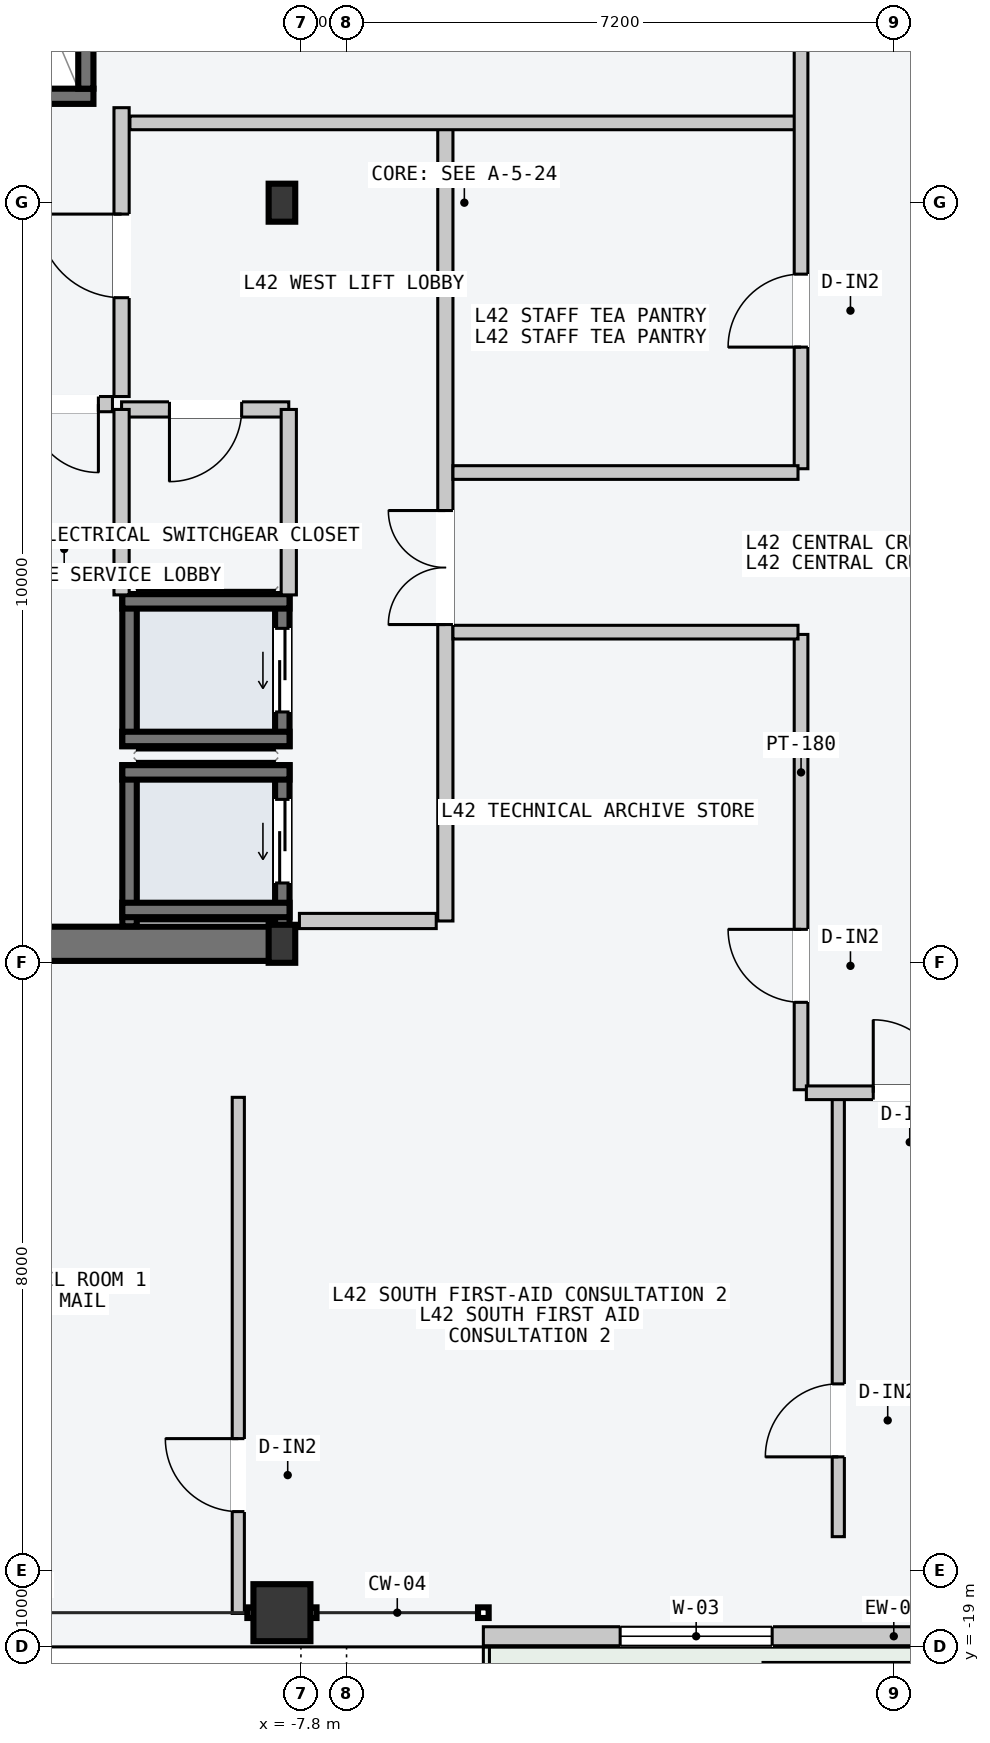
"""IFC4 building model, lengths in metres.
Left out: names, types, materials, properties, quantities, classifications, styles, units other than length and angle.
Written with IfcOpenShell. Run it as: python <this file> out.ifc"""

import sys

from ifc_helpers import new_model, si_unit, direction, frame, frame_2d, origin, origin_2d, place, context, subcontext, project, spatial, rectangle, hollow_rectangle, i_section, extrude, element, fill, save


model = new_model("IFC4")
c1 = context("Model", 3, precision=1e-05, world=origin(), true_north=direction((0.0, 1.0)))
c2 = subcontext(c1, "Body", "Model", "MODEL_VIEW")
j1 = project(units=[si_unit("LENGTHUNIT", "METRE"), si_unit("PLANEANGLEUNIT", "RADIAN")], contexts=[c1])
p1 = place(None, origin())
s1 = spatial("IfcSite", under=j1, at=p1, CompositionType="ELEMENT")
p2 = place(p1, origin())
s2 = spatial("IfcBuilding", under=s1, at=p2, CompositionType="ELEMENT")
p3 = place(p2, frame((0.0, 0.0, 162.3)))
s3 = spatial("IfcBuildingStorey", under=s2, at=p3, CompositionType="ELEMENT", Elevation=162.3)
p4 = place(p3, frame((-14.53, -9.75, -0.2), z_axis=(0.0, 0.0, 1.0), x_axis=(1.0, 0.0, 0.0)))
e1 = element("IfcWall", 1, at=p4, inside=s3, PredefinedType="SHEAR", context=c2, shape_type="SweptSolid", body=[
    extrude(rectangle(XDim=6.46, YDim=0.45, at=frame_2d((3.23, 0.0))), origin(), (0.0, 0.0, 1.0), 3.6),
])
p5 = place(p3, frame((-14.25, 1.4, -0.2), z_axis=(0.0, 0.0, 1.0), x_axis=(1.0, 0.0, 0.0)))
e2 = element("IfcWall", 2, at=p5, inside=s3, PredefinedType="SOLIDWALL", context=c2, shape_type="SweptSolid", body=[
    extrude(rectangle(XDim=3.72, YDim=0.2, at=frame_2d((1.86, 0.0))), origin(), (0.0, 0.0, 1.0), 3.6),
])
p6 = place(p5, frame((1.5, 0.0, 0.2)))
e3 = element("IfcOpeningElement", 3, at=p6, cuts=e2, PredefinedType="OPENING", context=c2, shape_type="SweptSolid", body=[
    extrude(rectangle(XDim=1.12, YDim=2.18, at=frame_2d((0.56, 1.09))), frame((0.0, 0.11, 0.0), z_axis=(0.0, -1.0, 0.0), x_axis=(1.0, 0.0, 0.0)), (0.0, 0.0, 1.0), 0.22),
])
p7 = place(p3, frame((-10.63, 1.5, -0.2), z_axis=(0.0, 0.0, 1.0), x_axis=(0.0, 1.0, 0.0)))
e4 = element("IfcWall", 4, at=p7, inside=s3, PredefinedType="SOLIDWALL", context=c2, shape_type="SweptSolid", body=[
    extrude(rectangle(XDim=7.8, YDim=0.2, at=frame_2d((3.9, 0.0))), origin(), (0.0, 0.0, 1.0), 3.6),
])
for number, where, z_axis, x_axis in (
    (5, (-8.05, -9.75, 0.0), (0.0, 0.0, 1.0), (1.0, 0.0, 0.0)),
    (6, (-8.05, 0.0, 0.0), (0.0, 0.0, 1.0), (1.0, 0.0, 0.0)),
):
    element("IfcColumn", number, at=place(p3, frame(where, z_axis=z_axis, x_axis=x_axis)), inside=s3, PredefinedType="COLUMN", context=c2, shape_type="SweptSolid", body=[
        extrude(i_section(OverallWidth=0.35, OverallDepth=0.5, WebThickness=0.02, FlangeThickness=0.032, at=origin_2d()), origin(), (0.0, 0.0, 1.0), 3.6),
    ])
p8 = place(p3, frame((-8.05, -18.55, 0.0), z_axis=(0.0, 0.0, 1.0), x_axis=(1.0, 0.0, 0.0)))
e7 = element("IfcColumn", 7, at=p8, inside=s3, PredefinedType="COLUMN", context=c2, shape_type="SweptSolid", body=[
    extrude(hollow_rectangle(XDim=0.75, YDim=0.75, WallThickness=0.032, at=origin_2d()), origin(), (0.0, 0.0, 1.0), 3.6),
])
p9 = place(p3, frame((-5.4, -18.86, 0.0), z_axis=(0.0, 0.0, 1.0), x_axis=(1.0, 0.0, 0.0)))
e8 = element("IfcWall", 8, at=p9, inside=s3, PredefinedType="STANDARD", context=c2, shape_type="SweptSolid", body=[
    extrude(rectangle(XDim=10.8, YDim=0.25, at=frame_2d((5.4, 0.0))), origin(), (0.0, 0.0, 1.0), 3.4),
])
p10 = place(p9, frame((7.0, 0.0, 0.0)))
e9 = element("IfcOpeningElement", 9, at=p10, cuts=e8, PredefinedType="OPENING", context=c2, shape_type="SweptSolid", body=[
    extrude(rectangle(XDim=1.6, YDim=2.2, at=frame_2d((0.8, 1.1))), frame((0.0, 0.135, 0.0), z_axis=(0.0, -1.0, 0.0), x_axis=(1.0, 0.0, 0.0)), (0.0, 0.0, 1.0), 0.27),
])
p11 = place(p9, frame((1.8, 0.0, 0.85)))
e10 = element("IfcOpeningElement", 10, at=p11, cuts=e8, PredefinedType="OPENING", context=c2, shape_type="SweptSolid", body=[
    extrude(rectangle(XDim=2.0, YDim=2.1, at=frame_2d((1.0, 1.05))), frame((0.0, 0.135, 0.0), z_axis=(0.0, -1.0, 0.0), x_axis=(1.0, 0.0, 0.0)), (0.0, 0.0, 1.0), 0.27),
])
p12 = place(p3, frame((-8.045, -9.52, -0.2), z_axis=(0.0, 0.0, 1.0), x_axis=(0.0, 1.0, 0.0)))
e11 = element("IfcWall", 11, at=p12, inside=s3, PredefinedType="SOLIDWALL", context=c2, shape_type="SweptSolid", body=[
    extrude(rectangle(XDim=2.12, YDim=0.19, at=frame_2d((1.06, 0.0))), origin(), (0.0, 0.0, 1.0), 3.6),
])
p13 = place(p12, frame((0.57, 0.0, 0.2)))
e12 = element("IfcOpeningElement", 12, at=p13, cuts=e11, PredefinedType="OPENING", context=c2, shape_type="SweptSolid", body=[
    extrude(rectangle(XDim=1.1, YDim=2.2, at=frame_2d((0.55, 1.1))), frame((0.0, 0.105, 0.0), z_axis=(0.0, -1.0, 0.0), x_axis=(1.0, 0.0, 0.0)), (0.0, 0.0, 1.0), 0.21),
])
p14 = place(p3, frame((-10.055, -9.52, -0.2), z_axis=(0.0, 0.0, 1.0), x_axis=(0.0, 1.0, 0.0)))
e13 = element("IfcWall", 13, at=p14, inside=s3, PredefinedType="SOLIDWALL", context=c2, shape_type="SweptSolid", body=[
    extrude(rectangle(XDim=2.12, YDim=0.19, at=frame_2d((1.06, 0.0))), origin(), (0.0, 0.0, 1.0), 3.6),
])
for number, where, z_axis, x_axis in (
    (14, (-10.15, -7.495, -0.2), (0.0, 0.0, 1.0), (1.0, 0.0, 0.0)),
    (15, (-10.15, -9.305, -0.2), (0.0, 0.0, 1.0), (1.0, 0.0, 0.0)),
):
    element("IfcWall", number, at=place(p3, frame(where, z_axis=z_axis, x_axis=x_axis)), inside=s3, PredefinedType="SOLIDWALL", context=c2, shape_type="SweptSolid", body=[
        extrude(rectangle(XDim=2.2, YDim=0.19, at=frame_2d((1.1, 0.0))), origin(), (0.0, 0.0, 1.0), 3.6),
    ])
p15 = place(p3, frame((-8.045, -7.15, -0.2), z_axis=(0.0, 0.0, 1.0), x_axis=(0.0, 1.0, 0.0)))
e16 = element("IfcWall", 16, at=p15, inside=s3, PredefinedType="SOLIDWALL", context=c2, shape_type="SweptSolid", body=[
    extrude(rectangle(XDim=2.0, YDim=0.19, at=frame_2d((1.0, 0.0))), origin(), (0.0, 0.0, 1.0), 3.6),
])
p16 = place(p15, frame((0.45, 0.0, 0.2)))
e17 = element("IfcOpeningElement", 17, at=p16, cuts=e16, PredefinedType="OPENING", context=c2, shape_type="SweptSolid", body=[
    extrude(rectangle(XDim=1.1, YDim=2.2, at=frame_2d((0.55, 1.1))), frame((0.0, 0.105, 0.0), z_axis=(0.0, -1.0, 0.0), x_axis=(1.0, 0.0, 0.0)), (0.0, 0.0, 1.0), 0.21),
])
p17 = place(p3, frame((-10.055, -7.15, -0.2), z_axis=(0.0, 0.0, 1.0), x_axis=(0.0, 1.0, 0.0)))
e18 = element("IfcWall", 18, at=p17, inside=s3, PredefinedType="SOLIDWALL", context=c2, shape_type="SweptSolid", body=[
    extrude(rectangle(XDim=2.0, YDim=0.19, at=frame_2d((1.0, 0.0))), origin(), (0.0, 0.0, 1.0), 3.6),
])
for number, where, z_axis, x_axis in (
    (19, (-10.15, -5.245, -0.2), (0.0, 0.0, 1.0), (1.0, 0.0, 0.0)),
    (20, (-10.15, -7.055, -0.2), (0.0, 0.0, 1.0), (1.0, 0.0, 0.0)),
):
    element("IfcWall", number, at=place(p3, frame(where, z_axis=z_axis, x_axis=x_axis)), inside=s3, PredefinedType="SOLIDWALL", context=c2, shape_type="SweptSolid", body=[
        extrude(rectangle(XDim=2.2, YDim=0.19, at=frame_2d((1.1, 0.0))), origin(), (0.0, 0.0, 1.0), 3.6),
    ])
p18 = place(p3, frame((-5.9, -9.45, 0.0), z_axis=(0.0, 0.0, 1.0), x_axis=(0.0, 1.0, 0.0)))
e21 = element("IfcWall", 21, at=p18, inside=s3, PredefinedType="PARTITIONING", context=c2, shape_type="SweptSolid", body=[
    extrude(rectangle(XDim=10.5, YDim=0.2, at=frame_2d((5.25, 0.0))), origin(), (0.0, 0.0, 1.0), 3.4),
])
p19 = place(p18, frame((3.9, 0.0, 0.0)))
e22 = element("IfcOpeningElement", 22, at=p19, cuts=e21, PredefinedType="OPENING", context=c2, shape_type="SweptSolid", body=[
    extrude(rectangle(XDim=1.5, YDim=2.2, at=frame_2d((0.75, 1.1))), frame((0.0, 0.11, 0.0), z_axis=(0.0, -1.0, 0.0), x_axis=(1.0, 0.0, 0.0)), (0.0, 0.0, 1.0), 0.22),
])
p20 = place(p3, frame((-6.02, -9.45, 0.0), z_axis=(0.0, 0.0, 1.0), x_axis=(-1.0, 0.0, 0.0)))
e23 = element("IfcWall", 23, at=p20, inside=s3, PredefinedType="PARTITIONING", context=c2, shape_type="SweptSolid", body=[
    extrude(rectangle(XDim=1.8, YDim=0.2, at=frame_2d((0.9, 0.0))), origin(), (0.0, 0.0, 1.0), 3.4),
])
p21 = place(p3, frame((-10.16, -2.55, 0.0), z_axis=(0.0, 0.0, 1.0), x_axis=(0.0, 1.0, 0.0)))
e24 = element("IfcWall", 24, at=p21, inside=s3, PredefinedType="PARTITIONING", context=c2, shape_type="SweptSolid", body=[
    extrude(rectangle(XDim=3.8, YDim=0.2, at=frame_2d((1.9, 0.0))), origin(), (0.0, 0.0, 1.0), 3.4),
])
p22 = place(p21, frame((1.3, 0.0, 0.0)))
e25 = element("IfcOpeningElement", 25, at=p22, cuts=e24, PredefinedType="OPENING", context=c2, shape_type="SweptSolid", body=[
    extrude(rectangle(XDim=1.1, YDim=2.15, at=frame_2d((0.55, 1.075))), frame((0.0, 0.11, 0.0), z_axis=(0.0, -1.0, 0.0), x_axis=(1.0, 0.0, 0.0)), (0.0, 0.0, 1.0), 0.22),
])
p23 = place(p3, frame((-10.28, -2.65, 0.0), z_axis=(0.0, 0.0, 1.0), x_axis=(-1.0, 0.0, 0.0)))
e26 = element("IfcWall", 26, at=p23, inside=s3, PredefinedType="PARTITIONING", context=c2, shape_type="SweptSolid", body=[
    extrude(rectangle(XDim=1.27, YDim=0.2, at=frame_2d((0.635, 0.0))), origin(), (0.0, 0.0, 1.0), 3.4),
])
p24 = place(p23, frame((0.185, 0.0, 0.0)))
e27 = element("IfcOpeningElement", 27, at=p24, cuts=e26, PredefinedType="OPENING", context=c2, shape_type="SweptSolid", body=[
    extrude(rectangle(XDim=0.9, YDim=2.15, at=frame_2d((0.45, 1.075))), frame((0.0, 0.11, 0.0), z_axis=(0.0, -1.0, 0.0), x_axis=(1.0, 0.0, 0.0)), (0.0, 0.0, 1.0), 0.22),
])
p25 = place(p3, frame((-7.96, -2.72, 0.0), z_axis=(0.0, 0.0, 1.0), x_axis=(-1.0, 0.0, 0.0)))
e28 = element("IfcWall", 28, at=p25, inside=s3, PredefinedType="PARTITIONING", context=c2, shape_type="SweptSolid", body=[
    extrude(rectangle(XDim=2.2, YDim=0.2, at=frame_2d((1.1, 0.0))), origin(), (0.0, 0.0, 1.0), 3.4),
])
p26 = place(p25, frame((0.62, 0.0, 0.0)))
e29 = element("IfcOpeningElement", 29, at=p26, cuts=e28, PredefinedType="OPENING", context=c2, shape_type="SweptSolid", body=[
    extrude(rectangle(XDim=0.95, YDim=2.1, at=frame_2d((0.475, 1.05))), frame((0.0, 0.11, 0.0), z_axis=(0.0, -1.0, 0.0), x_axis=(1.0, 0.0, 0.0)), (0.0, 0.0, 1.0), 0.22),
])
for number, where, z_axis, x_axis in (
    (30, (-7.96, -5.16, 0.0), (0.0, 0.0, 1.0), (0.0, 1.0, 0.0)),
    (31, (-10.16, -5.16, 0.0), (0.0, 0.0, 1.0), (0.0, 1.0, 0.0)),
):
    element("IfcWall", number, at=place(p3, frame(where, z_axis=z_axis, x_axis=x_axis)), inside=s3, PredefinedType="PARTITIONING", context=c2, shape_type="SweptSolid", body=[
        extrude(rectangle(XDim=2.44, YDim=0.2, at=frame_2d((1.22, 0.0))), origin(), (0.0, 0.0, 1.0), 3.4),
    ])
p27 = place(p3, frame((-10.05, 1.05, 0.0), z_axis=(0.0, 0.0, 1.0), x_axis=(1.0, 0.0, 0.0)))
e32 = element("IfcWall", 32, at=p27, inside=s3, PredefinedType="PARTITIONING", context=c2, shape_type="SweptSolid", body=[
    extrude(rectangle(XDim=8.79, YDim=0.18, at=frame_2d((4.395, 0.0))), origin(), (0.0, 0.0, 1.0), 3.4),
])
p28 = place(p3, frame((-1.22, -3.5, 0.0), z_axis=(0.0, 0.0, 1.0), x_axis=(0.0, 1.0, 0.0)))
e33 = element("IfcWall", 33, at=p28, inside=s3, PredefinedType="PARTITIONING", context=c2, shape_type="SweptSolid", body=[
    extrude(rectangle(XDim=13.51, YDim=0.18, at=frame_2d((6.755, 0.0))), origin(), (0.0, 0.0, 1.0), 3.4),
])
p29 = place(p28, frame((6.1, 0.0, 0.0)))
e34 = element("IfcOpeningElement", 34, at=p29, cuts=e33, PredefinedType="OPENING", context=c2, shape_type="SweptSolid", body=[
    extrude(rectangle(XDim=1.24, YDim=2.24, at=frame_2d((0.62, 1.12))), frame((0.0, 0.1, 0.0), z_axis=(0.0, -1.0, 0.0), x_axis=(1.0, 0.0, 0.0)), (0.0, 0.0, 1.0), 0.2),
])
p30 = place(p28, frame((1.6, 0.0, 0.0)))
e35 = element("IfcOpeningElement", 35, at=p30, cuts=e33, PredefinedType="OPENING", context=c2, shape_type="SweptSolid", body=[
    extrude(rectangle(XDim=0.96, YDim=2.18, at=frame_2d((0.48, 1.09))), frame((0.0, 0.1, 0.0), z_axis=(0.0, -1.0, 0.0), x_axis=(1.0, 0.0, 0.0)), (0.0, 0.0, 1.0), 0.2),
])
p31 = place(p3, frame((-5.8, -3.55, 0.0), z_axis=(0.0, 0.0, 1.0), x_axis=(1.0, 0.0, 0.0)))
e36 = element("IfcWall", 36, at=p31, inside=s3, PredefinedType="PARTITIONING", context=c2, shape_type="SweptSolid", body=[
    extrude(rectangle(XDim=4.54, YDim=0.18, at=frame_2d((2.27, 0.0))), origin(), (0.0, 0.0, 1.0), 3.4),
])
p32 = place(p3, frame((-1.22, -11.67, 0.0), z_axis=(0.0, 0.0, 1.0), x_axis=(0.0, 1.0, 0.0)))
e37 = element("IfcWall", 37, at=p32, inside=s3, PredefinedType="PARTITIONING", context=c2, shape_type="SweptSolid", body=[
    extrude(rectangle(XDim=5.99, YDim=0.18, at=frame_2d((2.995, 0.0))), origin(), (0.0, 0.0, 1.0), 3.4),
])
p33 = place(p32, frame((1.15, 0.0, 0.0)))
e38 = element("IfcOpeningElement", 38, at=p33, cuts=e37, PredefinedType="OPENING", context=c2, shape_type="SweptSolid", body=[
    extrude(rectangle(XDim=0.96, YDim=2.18, at=frame_2d((0.48, 1.09))), frame((0.0, 0.1, 0.0), z_axis=(0.0, -1.0, 0.0), x_axis=(1.0, 0.0, 0.0)), (0.0, 0.0, 1.0), 0.2),
])
p34 = place(p3, frame((-5.8, -5.65, 0.0), z_axis=(0.0, 0.0, 1.0), x_axis=(1.0, 0.0, 0.0)))
e39 = element("IfcWall", 39, at=p34, inside=s3, PredefinedType="PARTITIONING", context=c2, shape_type="SweptSolid", body=[
    extrude(rectangle(XDim=4.54, YDim=0.18, at=frame_2d((2.27, 0.0))), origin(), (0.0, 0.0, 1.0), 3.4),
])
p35 = place(p3, frame((-8.624, -18.56, 0.0), z_axis=(0.0, 0.0, 1.0), x_axis=(0.0, 1.0, 0.0)))
e40 = element("IfcWall", 40, at=p35, inside=s3, PredefinedType="PARTITIONING", context=c2, shape_type="SweptSolid", body=[
    extrude(rectangle(XDim=6.79, YDim=0.16, at=frame_2d((3.395, 0.0))), origin(), (0.0, 0.0, 1.0), 3.4),
])
p36 = place(p35, frame((1.34, 0.0, 0.0)))
e41 = element("IfcOpeningElement", 41, at=p36, cuts=e40, PredefinedType="OPENING", context=c2, shape_type="SweptSolid", body=[
    extrude(rectangle(XDim=0.96, YDim=2.18, at=frame_2d((0.48, 1.09))), frame((0.0, 0.09, 0.0), z_axis=(0.0, -1.0, 0.0), x_axis=(1.0, 0.0, 0.0)), (0.0, 0.0, 1.0), 0.18),
])
p37 = place(p3, frame((-0.73, -17.55, 0.0), z_axis=(0.0, 0.0, 1.0), x_axis=(0.0, 1.0, 0.0)))
e42 = element("IfcWall", 42, at=p37, inside=s3, PredefinedType="PARTITIONING", context=c2, shape_type="SweptSolid", body=[
    extrude(rectangle(XDim=5.78, YDim=0.16, at=frame_2d((2.89, 0.0))), origin(), (0.0, 0.0, 1.0), 3.4),
])
p38 = place(p37, frame((1.05, 0.0, 0.0)))
e43 = element("IfcOpeningElement", 43, at=p38, cuts=e42, PredefinedType="OPENING", context=c2, shape_type="SweptSolid", body=[
    extrude(rectangle(XDim=0.96, YDim=2.18, at=frame_2d((0.48, 1.09))), frame((0.0, 0.09, 0.0), z_axis=(0.0, -1.0, 0.0), x_axis=(1.0, 0.0, 0.0)), (0.0, 0.0, 1.0), 0.18),
])
p39 = place(p3, frame((-1.15, -11.71, 0.0), z_axis=(0.0, 0.0, 1.0), x_axis=(1.0, 0.0, 0.0)))
e44 = element("IfcWall", 44, at=p39, inside=s3, PredefinedType="PARTITIONING", context=c2, shape_type="SweptSolid", body=[
    extrude(rectangle(XDim=2.3, YDim=0.18, at=frame_2d((1.15, 0.0))), origin(), (0.0, 0.0, 1.0), 3.4),
])
p40 = place(p39, frame((0.88, 0.0, 0.0)))
e45 = element("IfcOpeningElement", 45, at=p40, cuts=e44, PredefinedType="OPENING", context=c2, shape_type="SweptSolid", body=[
    extrude(rectangle(XDim=0.96, YDim=2.18, at=frame_2d((0.48, 1.09))), frame((0.0, 0.1, 0.0), z_axis=(0.0, -1.0, 0.0), x_axis=(1.0, 0.0, 0.0)), (0.0, 0.0, 1.0), 0.2),
])
p41 = place(p11, origin())
e46 = element("IfcWindow", 46, at=p41, inside=s3, PartitioningType="SINGLE_PANEL", PredefinedType="WINDOW", context=c2, shape_type="SweptSolid", body=[
    extrude(rectangle(XDim=2.0, YDim=2.1, at=frame_2d((1.0, 1.05))), frame((0.0, 0.03, 0.0), z_axis=(0.0, -1.0, 0.0), x_axis=(1.0, 0.0, 0.0)), (0.0, 0.0, 1.0), 0.06),
])
fill(e10, e46)
p42 = place(p13, origin())
e47 = element("IfcDoor", 47, at=p42, inside=s3, OperationType="SLIDING_TO_LEFT", PredefinedType="DOOR", context=c2, shape_type="SweptSolid", body=[
    extrude(rectangle(XDim=1.1, YDim=2.2, at=frame_2d((0.55, 1.1))), frame((0.0, 0.025, 0.0), z_axis=(0.0, -1.0, 0.0), x_axis=(1.0, 0.0, 0.0)), (0.0, 0.0, 1.0), 0.05),
])
fill(e12, e47)
p43 = place(p16, origin())
e48 = element("IfcDoor", 48, at=p43, inside=s3, OperationType="SLIDING_TO_LEFT", PredefinedType="DOOR", context=c2, shape_type="SweptSolid", body=[
    extrude(rectangle(XDim=1.1, YDim=2.2, at=frame_2d((0.55, 1.1))), frame((0.0, 0.025, 0.0), z_axis=(0.0, -1.0, 0.0), x_axis=(1.0, 0.0, 0.0)), (0.0, 0.0, 1.0), 0.05),
])
fill(e17, e48)
p44 = place(p19, origin())
e49 = element("IfcDoor", 49, at=p44, inside=s3, OperationType="DOUBLE_DOOR_SINGLE_SWING", PredefinedType="DOOR", context=c2, shape_type="SweptSolid", body=[
    extrude(rectangle(XDim=1.5, YDim=2.2, at=frame_2d((0.75, 1.1))), frame((0.0, 0.025, 0.0), z_axis=(0.0, -1.0, 0.0), x_axis=(1.0, 0.0, 0.0)), (0.0, 0.0, 1.0), 0.05),
])
fill(e22, e49)
p45 = place(p22, origin())
e50 = element("IfcDoor", 50, at=p45, inside=s3, OperationType="SINGLE_SWING_RIGHT", PredefinedType="DOOR", context=c2, shape_type="SweptSolid", body=[
    extrude(rectangle(XDim=1.1, YDim=2.15, at=frame_2d((0.55, 1.075))), frame((0.0, 0.025, 0.0), z_axis=(0.0, -1.0, 0.0), x_axis=(1.0, 0.0, 0.0)), (0.0, 0.0, 1.0), 0.05),
])
fill(e25, e50)
p46 = place(p24, origin())
e51 = element("IfcDoor", 51, at=p46, inside=s3, OperationType="SINGLE_SWING_LEFT", PredefinedType="DOOR", context=c2, shape_type="SweptSolid", body=[
    extrude(rectangle(XDim=0.9, YDim=2.15, at=frame_2d((0.45, 1.075))), frame((0.0, 0.025, 0.0), z_axis=(0.0, -1.0, 0.0), x_axis=(1.0, 0.0, 0.0)), (0.0, 0.0, 1.0), 0.05),
])
fill(e27, e51)
p47 = place(p26, origin())
e52 = element("IfcDoor", 52, at=p47, inside=s3, OperationType="SINGLE_SWING_RIGHT", PredefinedType="DOOR", context=c2, shape_type="SweptSolid", body=[
    extrude(rectangle(XDim=0.95, YDim=2.1, at=frame_2d((0.475, 1.05))), frame((0.0, 0.025, 0.0), z_axis=(0.0, -1.0, 0.0), x_axis=(1.0, 0.0, 0.0)), (0.0, 0.0, 1.0), 0.05),
])
fill(e29, e52)
p48 = place(p30, origin())
e53 = element("IfcDoor", 53, at=p48, inside=s3, OperationType="SINGLE_SWING_LEFT", PredefinedType="DOOR", context=c2, shape_type="SweptSolid", body=[
    extrude(rectangle(XDim=0.96, YDim=2.18, at=frame_2d((0.48, 1.09))), frame((0.0, 0.025, 0.0), z_axis=(0.0, -1.0, 0.0), x_axis=(1.0, 0.0, 0.0)), (0.0, 0.0, 1.0), 0.05),
])
fill(e35, e53)
p49 = place(p33, origin())
e54 = element("IfcDoor", 54, at=p49, inside=s3, OperationType="SINGLE_SWING_RIGHT", PredefinedType="DOOR", context=c2, shape_type="SweptSolid", body=[
    extrude(rectangle(XDim=0.96, YDim=2.18, at=frame_2d((0.48, 1.09))), frame((0.0, 0.025, 0.0), z_axis=(0.0, -1.0, 0.0), x_axis=(1.0, 0.0, 0.0)), (0.0, 0.0, 1.0), 0.05),
])
fill(e38, e54)
p50 = place(p36, origin())
e55 = element("IfcDoor", 55, at=p50, inside=s3, OperationType="SINGLE_SWING_RIGHT", PredefinedType="DOOR", context=c2, shape_type="SweptSolid", body=[
    extrude(rectangle(XDim=0.96, YDim=2.18, at=frame_2d((0.48, 1.09))), frame((0.0, 0.025, 0.0), z_axis=(0.0, -1.0, 0.0), x_axis=(1.0, 0.0, 0.0)), (0.0, 0.0, 1.0), 0.05),
])
fill(e41, e55)
p51 = place(p38, origin())
e56 = element("IfcDoor", 56, at=p51, inside=s3, OperationType="SINGLE_SWING_LEFT", PredefinedType="DOOR", context=c2, shape_type="SweptSolid", body=[
    extrude(rectangle(XDim=0.96, YDim=2.18, at=frame_2d((0.48, 1.09))), frame((0.0, 0.025, 0.0), z_axis=(0.0, -1.0, 0.0), x_axis=(1.0, 0.0, 0.0)), (0.0, 0.0, 1.0), 0.05),
])
fill(e43, e56)
p52 = place(p40, origin())
e57 = element("IfcDoor", 57, at=p52, inside=s3, OperationType="SINGLE_SWING_LEFT", PredefinedType="DOOR", context=c2, shape_type="SweptSolid", body=[
    extrude(rectangle(XDim=0.96, YDim=2.18, at=frame_2d((0.48, 1.09))), frame((0.0, 0.025, 0.0), z_axis=(0.0, -1.0, 0.0), x_axis=(1.0, 0.0, 0.0)), (0.0, 0.0, 1.0), 0.05),
])
fill(e45, e57)
save(model, sys.argv[1])
